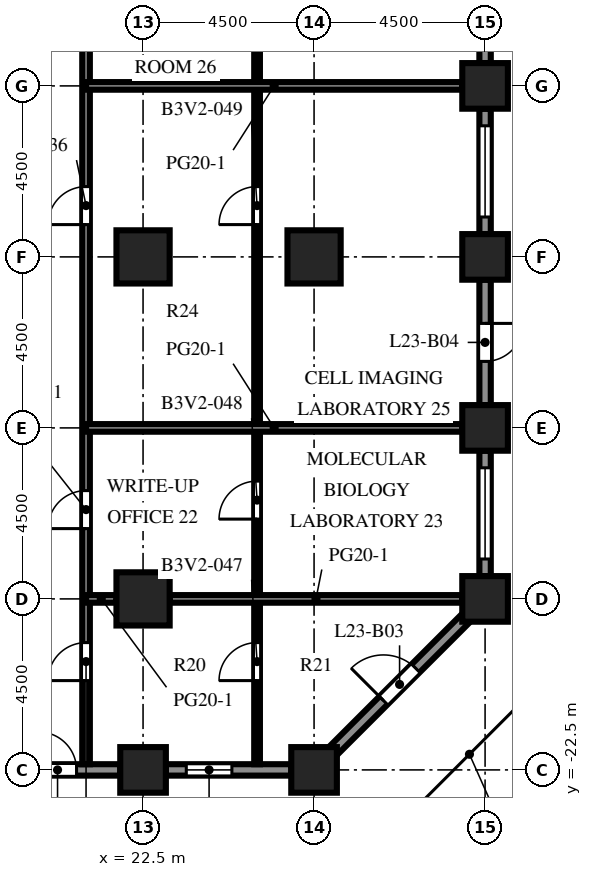
"""IFC4 building model, lengths in metres.
Left out: names, types, materials, properties, quantities, classifications, styles, units other than length and angle.
Written with IfcOpenShell. Run it as: python <this file> out.ifc"""

import sys

from ifc_helpers import new_model, si_unit, direction, frame, frame_2d, origin, origin_2d, place, context, subcontext, project, spatial, rectangle, extrude, element, fill, save


model = new_model("IFC4")
c1 = context("Model", 3, precision=1e-05, world=origin(), true_north=direction((0.0, 1.0)))
c2 = subcontext(c1, "Body", "Model", "MODEL_VIEW")
j1 = project(units=[si_unit("LENGTHUNIT", "METRE"), si_unit("PLANEANGLEUNIT", "RADIAN")], contexts=[c1])
p1 = place(None, origin())
s1 = spatial("IfcSite", under=j1, at=p1, CompositionType="ELEMENT")
p2 = place(p1, origin())
s2 = spatial("IfcBuilding", under=s1, at=p2, CompositionType="ELEMENT")
p3 = place(p2, frame((0.0, 0.0, 102.5)))
s3 = spatial("IfcBuildingStorey", under=s2, at=p3, CompositionType="ELEMENT", Elevation=102.5)
for number, where, z_axis, x_axis in (
    (1, (22.5, -22.5, 0.0), (0.0, 0.0, 1.0), (1.0, 0.0, 0.0)),
    (2, (27.0, -22.5, 0.0), (0.0, 0.0, 1.0), (1.0, 0.0, 0.0)),
    (3, (31.5, -18.0, 0.0), (0.0, 0.0, 1.0), (1.0, 0.0, 0.0)),
    (4, (31.5, -13.5, 0.0), (0.0, 0.0, 1.0), (1.0, 0.0, 0.0)),
    (5, (31.5, -9.0, 0.0), (0.0, 0.0, 1.0), (1.0, 0.0, 0.0)),
    (6, (31.5, -4.5, 0.0), (0.0, 0.0, 1.0), (1.0, 0.0, 0.0)),
):
    element("IfcColumn", number, at=place(p3, frame(where, z_axis=z_axis, x_axis=x_axis)), inside=s3, PredefinedType="COLUMN", context=c2, shape_type="SweptSolid", body=[
        extrude(rectangle(XDim=1.2, YDim=1.2, at=origin_2d()), origin(), (0.0, 0.0, 1.0), 4.1),
    ])
for number, where, z_axis, x_axis in (
    (7, (22.5, -18.0, 0.0), (0.0, 0.0, 1.0), (1.0, 0.0, 0.0)),
    (8, (22.5, -9.0, 0.0), (0.0, 0.0, 1.0), (1.0, 0.0, 0.0)),
    (9, (27.0, -9.0, 0.0), (0.0, 0.0, 1.0), (1.0, 0.0, 0.0)),
):
    element("IfcColumn", number, at=place(p3, frame(where, z_axis=z_axis, x_axis=x_axis)), inside=s3, PredefinedType="COLUMN", context=c2, shape_type="SweptSolid", body=[
        extrude(rectangle(XDim=1.4, YDim=1.4, at=origin_2d()), origin(), (0.0, 0.0, 1.0), 4.1),
    ])
p4 = place(p3, frame((21.9, -22.5, 0.0), z_axis=(0.0, 0.0, 1.0), x_axis=(-1.0, 0.0, 0.0)))
e10 = element("IfcWall", 10, at=p4, inside=s3, PredefinedType="SOLIDWALL", context=c2, shape_type="SweptSolid", body=[
    extrude(rectangle(XDim=3.3, YDim=0.3, at=frame_2d((1.65, 0.0))), origin(), (0.0, 0.0, 1.0), 2.75),
])
p5 = place(p4, frame((1.15, 0.0, 0.0)))
e11 = element("IfcOpeningElement", 11, at=p5, cuts=e10, PredefinedType="OPENING", context=c2, shape_type="SweptSolid", body=[
    extrude(rectangle(XDim=1.0, YDim=2.2, at=frame_2d((0.5, 1.1))), frame((0.0, 0.16, 0.0), z_axis=(0.0, -1.0, 0.0), x_axis=(1.0, 0.0, 0.0)), (0.0, 0.0, 1.0), 0.32),
])
p6 = place(p3, frame((26.4, -22.5, 0.0), z_axis=(0.0, 0.0, 1.0), x_axis=(-1.0, 0.0, 0.0)))
e12 = element("IfcWall", 12, at=p6, inside=s3, PredefinedType="SOLIDWALL", context=c2, shape_type="SweptSolid", body=[
    extrude(rectangle(XDim=3.3, YDim=0.3, at=frame_2d((1.65, 0.0))), origin(), (0.0, 0.0, 1.0), 2.75),
])
p7 = place(p6, frame((1.562, 0.0, 0.8)))
e13 = element("IfcOpeningElement", 13, at=p7, cuts=e12, PredefinedType="OPENING", context=c2, shape_type="SweptSolid", body=[
    extrude(rectangle(XDim=1.2, YDim=1.7, at=frame_2d((0.6, 0.85))), frame((0.0, 0.16, 0.0), z_axis=(0.0, -1.0, 0.0), x_axis=(1.0, 0.0, 0.0)), (0.0, 0.0, 1.0), 0.32),
])
p8 = place(p3, frame((31.006, -18.494, 0.0), z_axis=(0.0, 0.0, 1.0), x_axis=(-0.707106781187, -0.707106781187, 0.0)))
e14 = element("IfcWall", 14, at=p8, inside=s3, PredefinedType="SOLIDWALL", context=c2, shape_type="SweptSolid", body=[
    extrude(rectangle(XDim=4.967, YDim=0.3, at=frame_2d((2.483, 0.0))), origin(), (0.0, 0.0, 1.0), 2.75),
])
p9 = place(p8, frame((1.884, 0.0, 0.0)))
e15 = element("IfcOpeningElement", 15, at=p9, cuts=e14, PredefinedType="OPENING", context=c2, shape_type="SweptSolid", body=[
    extrude(rectangle(XDim=1.2, YDim=2.2, at=frame_2d((0.6, 1.1))), frame((0.0, 0.16, 0.0), z_axis=(0.0, -1.0, 0.0), x_axis=(1.0, 0.0, 0.0)), (0.0, 0.0, 1.0), 0.32),
])
p10 = place(p3, frame((31.5, -14.1, 0.0), z_axis=(0.0, 0.0, 1.0), x_axis=(0.0, -1.0, 0.0)))
e16 = element("IfcWall", 16, at=p10, inside=s3, PredefinedType="SOLIDWALL", context=c2, shape_type="SweptSolid", body=[
    extrude(rectangle(XDim=3.3, YDim=0.3, at=frame_2d((1.65, 0.0))), origin(), (0.0, 0.0, 1.0), 2.75),
])
p11 = place(p10, frame((0.45, 0.0, 0.8)))
e17 = element("IfcOpeningElement", 17, at=p11, cuts=e16, PredefinedType="OPENING", context=c2, shape_type="SweptSolid", body=[
    extrude(rectangle(XDim=2.4, YDim=1.7, at=frame_2d((1.2, 0.85))), frame((0.0, 0.16, 0.0), z_axis=(0.0, -1.0, 0.0), x_axis=(1.0, 0.0, 0.0)), (0.0, 0.0, 1.0), 0.32),
])
p12 = place(p3, frame((31.5, -9.6, 0.0), z_axis=(0.0, 0.0, 1.0), x_axis=(0.0, -1.0, 0.0)))
e18 = element("IfcWall", 18, at=p12, inside=s3, PredefinedType="SOLIDWALL", context=c2, shape_type="SweptSolid", body=[
    extrude(rectangle(XDim=3.3, YDim=0.3, at=frame_2d((1.65, 0.0))), origin(), (0.0, 0.0, 1.0), 2.75),
])
p13 = place(p12, frame((1.15, 0.0, 0.0)))
e19 = element("IfcOpeningElement", 19, at=p13, cuts=e18, PredefinedType="OPENING", context=c2, shape_type="SweptSolid", body=[
    extrude(rectangle(XDim=1.0, YDim=2.2, at=frame_2d((0.5, 1.1))), frame((0.0, 0.16, 0.0), z_axis=(0.0, -1.0, 0.0), x_axis=(1.0, 0.0, 0.0)), (0.0, 0.0, 1.0), 0.32),
])
p14 = place(p3, frame((31.5, -5.1, 0.0), z_axis=(0.0, 0.0, 1.0), x_axis=(0.0, -1.0, 0.0)))
e20 = element("IfcWall", 20, at=p14, inside=s3, PredefinedType="SOLIDWALL", context=c2, shape_type="SweptSolid", body=[
    extrude(rectangle(XDim=3.3, YDim=0.3, at=frame_2d((1.65, 0.0))), origin(), (0.0, 0.0, 1.0), 2.75),
])
p15 = place(p14, frame((0.45, 0.0, 0.8)))
e21 = element("IfcOpeningElement", 21, at=p15, cuts=e20, PredefinedType="OPENING", context=c2, shape_type="SweptSolid", body=[
    extrude(rectangle(XDim=2.4, YDim=1.7, at=frame_2d((1.2, 0.85))), frame((0.0, 0.16, 0.0), z_axis=(0.0, -1.0, 0.0), x_axis=(1.0, 0.0, 0.0)), (0.0, 0.0, 1.0), 0.32),
])
p16 = place(p3, frame((31.5, -0.6, 0.0), z_axis=(0.0, 0.0, 1.0), x_axis=(0.0, -1.0, 0.0)))
e22 = element("IfcWall", 22, at=p16, inside=s3, PredefinedType="SOLIDWALL", context=c2, shape_type="SweptSolid", body=[
    extrude(rectangle(XDim=3.3, YDim=0.3, at=frame_2d((1.65, 0.0))), origin(), (0.0, 0.0, 1.0), 2.75),
])
p17 = place(p16, frame((0.45, 0.0, 0.8)))
e23 = element("IfcOpeningElement", 23, at=p17, cuts=e22, PredefinedType="OPENING", context=c2, shape_type="SweptSolid", body=[
    extrude(rectangle(XDim=2.4, YDim=1.7, at=frame_2d((1.2, 0.85))), frame((0.0, 0.16, 0.0), z_axis=(0.0, -1.0, 0.0), x_axis=(1.0, 0.0, 0.0)), (0.0, 0.0, 1.0), 0.32),
])
p18 = place(p3, frame((21.0, 31.35, 0.0), z_axis=(0.0, 0.0, 1.0), x_axis=(0.0, -1.0, 0.0)))
e24 = element("IfcWall", 24, at=p18, inside=s3, PredefinedType="PARTITIONING", context=c2, shape_type="SweptSolid", body=[
    extrude(rectangle(XDim=53.7, YDim=0.2, at=frame_2d((26.85, 0.0))), origin(), (0.0, 0.0, 1.0), 3.65),
])
p19 = place(p18, frame((50.5, 0.0, 0.0)))
e25 = element("IfcOpeningElement", 25, at=p19, cuts=e24, PredefinedType="OPENING", context=c2, shape_type="SweptSolid", body=[
    extrude(rectangle(XDim=1.0, YDim=2.1, at=frame_2d((0.5, 1.05))), frame((0.0, 0.11, 0.0), z_axis=(0.0, -1.0, 0.0), x_axis=(1.0, 0.0, 0.0)), (0.0, 0.0, 1.0), 0.22),
])
p20 = place(p18, frame((46.5, 0.0, 0.0)))
e26 = element("IfcOpeningElement", 26, at=p20, cuts=e24, PredefinedType="OPENING", context=c2, shape_type="SweptSolid", body=[
    extrude(rectangle(XDim=1.0, YDim=2.1, at=frame_2d((0.5, 1.05))), frame((0.0, 0.11, 0.0), z_axis=(0.0, -1.0, 0.0), x_axis=(1.0, 0.0, 0.0)), (0.0, 0.0, 1.0), 0.22),
])
p21 = place(p18, frame((38.5, 0.0, 0.0)))
e27 = element("IfcOpeningElement", 27, at=p21, cuts=e24, PredefinedType="OPENING", context=c2, shape_type="SweptSolid", body=[
    extrude(rectangle(XDim=1.0, YDim=2.1, at=frame_2d((0.5, 1.05))), frame((0.0, 0.11, 0.0), z_axis=(0.0, -1.0, 0.0), x_axis=(1.0, 0.0, 0.0)), (0.0, 0.0, 1.0), 0.22),
])
p22 = place(p18, frame((33.0, 0.0, 0.0)))
e28 = element("IfcOpeningElement", 28, at=p22, cuts=e24, PredefinedType="OPENING", context=c2, shape_type="SweptSolid", body=[
    extrude(rectangle(XDim=1.0, YDim=2.1, at=frame_2d((0.5, 1.05))), frame((0.0, 0.11, 0.0), z_axis=(0.0, -1.0, 0.0), x_axis=(1.0, 0.0, 0.0)), (0.0, 0.0, 1.0), 0.22),
])
p23 = place(p18, frame((23.5, 0.0, 0.0)))
e29 = element("IfcOpeningElement", 29, at=p23, cuts=e24, PredefinedType="OPENING", context=c2, shape_type="SweptSolid", body=[
    extrude(rectangle(XDim=1.0, YDim=2.1, at=frame_2d((0.5, 1.05))), frame((0.0, 0.11, 0.0), z_axis=(0.0, -1.0, 0.0), x_axis=(1.0, 0.0, 0.0)), (0.0, 0.0, 1.0), 0.22),
])
p24 = place(p18, frame((15.75, 0.0, 0.0)))
e30 = element("IfcOpeningElement", 30, at=p24, cuts=e24, PredefinedType="OPENING", context=c2, shape_type="SweptSolid", body=[
    extrude(rectangle(XDim=1.0, YDim=2.1, at=frame_2d((0.5, 1.05))), frame((0.0, 0.11, 0.0), z_axis=(0.0, -1.0, 0.0), x_axis=(1.0, 0.0, 0.0)), (0.0, 0.0, 1.0), 0.22),
])
p25 = place(p18, frame((7.0, 0.0, 0.0)))
e31 = element("IfcOpeningElement", 31, at=p25, cuts=e24, PredefinedType="OPENING", context=c2, shape_type="SweptSolid", body=[
    extrude(rectangle(XDim=1.0, YDim=2.1, at=frame_2d((0.5, 1.05))), frame((0.0, 0.11, 0.0), z_axis=(0.0, -1.0, 0.0), x_axis=(1.0, 0.0, 0.0)), (0.0, 0.0, 1.0), 0.22),
])
p26 = place(p18, frame((1.0, 0.0, 0.0)))
e32 = element("IfcOpeningElement", 32, at=p26, cuts=e24, PredefinedType="OPENING", context=c2, shape_type="SweptSolid", body=[
    extrude(rectangle(XDim=1.0, YDim=2.1, at=frame_2d((0.5, 1.05))), frame((0.0, 0.11, 0.0), z_axis=(0.0, -1.0, 0.0), x_axis=(1.0, 0.0, 0.0)), (0.0, 0.0, 1.0), 0.22),
])
p27 = place(p3, frame((25.5, 31.35, 0.0), z_axis=(0.0, 0.0, 1.0), x_axis=(0.0, -1.0, 0.0)))
e33 = element("IfcWall", 33, at=p27, inside=s3, PredefinedType="PARTITIONING", context=c2, shape_type="SweptSolid", body=[
    extrude(rectangle(XDim=53.7, YDim=0.15, at=frame_2d((26.85, 0.0))), origin(), (0.0, 0.0, 1.0), 3.65),
])
p28 = place(p27, frame((50.5, 0.0, 0.0)))
e34 = element("IfcOpeningElement", 34, at=p28, cuts=e33, PredefinedType="OPENING", context=c2, shape_type="SweptSolid", body=[
    extrude(rectangle(XDim=1.0, YDim=2.1, at=frame_2d((0.5, 1.05))), frame((0.0, 0.085, 0.0), z_axis=(0.0, -1.0, 0.0), x_axis=(1.0, 0.0, 0.0)), (0.0, 0.0, 1.0), 0.17),
])
p29 = place(p27, frame((46.25, 0.0, 0.0)))
e35 = element("IfcOpeningElement", 35, at=p29, cuts=e33, PredefinedType="OPENING", context=c2, shape_type="SweptSolid", body=[
    extrude(rectangle(XDim=1.0, YDim=2.1, at=frame_2d((0.5, 1.05))), frame((0.0, 0.085, 0.0), z_axis=(0.0, -1.0, 0.0), x_axis=(1.0, 0.0, 0.0)), (0.0, 0.0, 1.0), 0.17),
])
p30 = place(p27, frame((38.5, 0.0, 0.0)))
e36 = element("IfcOpeningElement", 36, at=p30, cuts=e33, PredefinedType="OPENING", context=c2, shape_type="SweptSolid", body=[
    extrude(rectangle(XDim=1.0, YDim=2.1, at=frame_2d((0.5, 1.05))), frame((0.0, 0.085, 0.0), z_axis=(0.0, -1.0, 0.0), x_axis=(1.0, 0.0, 0.0)), (0.0, 0.0, 1.0), 0.17),
])
p31 = place(p27, frame((33.0, 0.0, 0.0)))
e37 = element("IfcOpeningElement", 37, at=p31, cuts=e33, PredefinedType="OPENING", context=c2, shape_type="SweptSolid", body=[
    extrude(rectangle(XDim=1.0, YDim=2.1, at=frame_2d((0.5, 1.05))), frame((0.0, 0.085, 0.0), z_axis=(0.0, -1.0, 0.0), x_axis=(1.0, 0.0, 0.0)), (0.0, 0.0, 1.0), 0.17),
])
p32 = place(p27, frame((24.75, 0.0, 0.0)))
e38 = element("IfcOpeningElement", 38, at=p32, cuts=e33, PredefinedType="OPENING", context=c2, shape_type="SweptSolid", body=[
    extrude(rectangle(XDim=1.0, YDim=2.1, at=frame_2d((0.5, 1.05))), frame((0.0, 0.085, 0.0), z_axis=(0.0, -1.0, 0.0), x_axis=(1.0, 0.0, 0.0)), (0.0, 0.0, 1.0), 0.17),
])
p33 = place(p27, frame((15.5, 0.0, 0.0)))
e39 = element("IfcOpeningElement", 39, at=p33, cuts=e33, PredefinedType="OPENING", context=c2, shape_type="SweptSolid", body=[
    extrude(rectangle(XDim=1.0, YDim=2.1, at=frame_2d((0.5, 1.05))), frame((0.0, 0.085, 0.0), z_axis=(0.0, -1.0, 0.0), x_axis=(1.0, 0.0, 0.0)), (0.0, 0.0, 1.0), 0.17),
])
p34 = place(p27, frame((9.75, 0.0, 0.0)))
e40 = element("IfcOpeningElement", 40, at=p34, cuts=e33, PredefinedType="OPENING", context=c2, shape_type="SweptSolid", body=[
    extrude(rectangle(XDim=1.0, YDim=2.1, at=frame_2d((0.5, 1.05))), frame((0.0, 0.085, 0.0), z_axis=(0.0, -1.0, 0.0), x_axis=(1.0, 0.0, 0.0)), (0.0, 0.0, 1.0), 0.17),
])
p35 = place(p27, frame((1.5, 0.0, 0.0)))
e41 = element("IfcOpeningElement", 41, at=p35, cuts=e33, PredefinedType="OPENING", context=c2, shape_type="SweptSolid", body=[
    extrude(rectangle(XDim=1.0, YDim=2.1, at=frame_2d((0.5, 1.05))), frame((0.0, 0.085, 0.0), z_axis=(0.0, -1.0, 0.0), x_axis=(1.0, 0.0, 0.0)), (0.0, 0.0, 1.0), 0.17),
])
p36 = place(p3, frame((21.0, -18.0, 0.0), z_axis=(0.0, 0.0, 1.0), x_axis=(1.0, 0.0, 0.0)))
e42 = element("IfcWall", 42, at=p36, inside=s3, PredefinedType="PARTITIONING", context=c2, shape_type="SweptSolid", body=[
    extrude(rectangle(XDim=0.8, YDim=0.2, at=frame_2d((0.4, 0.0))), origin(), (0.0, 0.0, 1.0), 3.65),
])
p37 = place(p3, frame((23.2, -18.0, 0.0), z_axis=(0.0, 0.0, 1.0), x_axis=(1.0, 0.0, 0.0)))
e43 = element("IfcWall", 43, at=p37, inside=s3, PredefinedType="PARTITIONING", context=c2, shape_type="SweptSolid", body=[
    extrude(rectangle(XDim=7.7, YDim=0.2, at=frame_2d((3.85, 0.0))), origin(), (0.0, 0.0, 1.0), 3.65),
])
for number, where, z_axis, x_axis in (
    (44, (21.0, -13.5, 0.0), (0.0, 0.0, 1.0), (1.0, 0.0, 0.0)),
    (45, (21.0, -4.5, 0.0), (0.0, 0.0, 1.0), (1.0, 0.0, 0.0)),
):
    element("IfcWall", number, at=place(p3, frame(where, z_axis=z_axis, x_axis=x_axis)), inside=s3, PredefinedType="PARTITIONING", context=c2, shape_type="SweptSolid", body=[
        extrude(rectangle(XDim=9.9, YDim=0.2, at=frame_2d((4.95, 0.0))), origin(), (0.0, 0.0, 1.0), 3.65),
    ])
p38 = place(p5, origin())
e46 = element("IfcDoor", 46, at=p38, inside=s3, OperationType="SINGLE_SWING_RIGHT", PredefinedType="DOOR", context=c2, shape_type="SweptSolid", body=[
    extrude(rectangle(XDim=1.0, YDim=2.2, at=frame_2d((0.5, 1.1))), frame((0.0, 0.025, 0.0), z_axis=(0.0, -1.0, 0.0), x_axis=(1.0, 0.0, 0.0)), (0.0, 0.0, 1.0), 0.05),
])
fill(e11, e46)
p39 = place(p7, origin())
e47 = element("IfcWindow", 47, at=p39, inside=s3, PartitioningType="SINGLE_PANEL", PredefinedType="WINDOW", context=c2, shape_type="SweptSolid", body=[
    extrude(rectangle(XDim=1.2, YDim=1.7, at=frame_2d((0.6, 0.85))), frame((0.0, 0.03, 0.0), z_axis=(0.0, -1.0, 0.0), x_axis=(1.0, 0.0, 0.0)), (0.0, 0.0, 1.0), 0.06),
])
fill(e13, e47)
p40 = place(p9, origin())
e48 = element("IfcDoor", 48, at=p40, inside=s3, OperationType="SINGLE_SWING_RIGHT", PredefinedType="DOOR", context=c2, shape_type="SweptSolid", body=[
    extrude(rectangle(XDim=1.2, YDim=2.2, at=frame_2d((0.6, 1.1))), frame((0.0, 0.025, 0.0), z_axis=(0.0, -1.0, 0.0), x_axis=(1.0, 0.0, 0.0)), (0.0, 0.0, 1.0), 0.05),
])
fill(e15, e48)
p41 = place(p11, origin())
e49 = element("IfcWindow", 49, at=p41, inside=s3, PartitioningType="SINGLE_PANEL", PredefinedType="WINDOW", context=c2, shape_type="SweptSolid", body=[
    extrude(rectangle(XDim=2.4, YDim=1.7, at=frame_2d((1.2, 0.85))), frame((0.0, 0.03, 0.0), z_axis=(0.0, -1.0, 0.0), x_axis=(1.0, 0.0, 0.0)), (0.0, 0.0, 1.0), 0.06),
])
fill(e17, e49)
p42 = place(p13, origin())
e50 = element("IfcDoor", 50, at=p42, inside=s3, OperationType="SINGLE_SWING_LEFT", PredefinedType="DOOR", context=c2, shape_type="SweptSolid", body=[
    extrude(rectangle(XDim=1.0, YDim=2.2, at=frame_2d((0.5, 1.1))), frame((0.0, 0.025, 0.0), z_axis=(0.0, -1.0, 0.0), x_axis=(1.0, 0.0, 0.0)), (0.0, 0.0, 1.0), 0.05),
])
fill(e19, e50)
p43 = place(p15, origin())
e51 = element("IfcWindow", 51, at=p43, inside=s3, PartitioningType="SINGLE_PANEL", PredefinedType="WINDOW", context=c2, shape_type="SweptSolid", body=[
    extrude(rectangle(XDim=2.4, YDim=1.7, at=frame_2d((1.2, 0.85))), frame((0.0, 0.03, 0.0), z_axis=(0.0, -1.0, 0.0), x_axis=(1.0, 0.0, 0.0)), (0.0, 0.0, 1.0), 0.06),
])
fill(e21, e51)
p44 = place(p19, origin())
e52 = element("IfcDoor", 52, at=p44, inside=s3, OperationType="SINGLE_SWING_RIGHT", PredefinedType="DOOR", context=c2, shape_type="SweptSolid", body=[
    extrude(rectangle(XDim=1.0, YDim=2.1, at=frame_2d((0.5, 1.05))), frame((0.0, 0.025, 0.0), z_axis=(0.0, -1.0, 0.0), x_axis=(1.0, 0.0, 0.0)), (0.0, 0.0, 1.0), 0.05),
])
fill(e25, e52)
p45 = place(p20, origin())
e53 = element("IfcDoor", 53, at=p45, inside=s3, OperationType="SINGLE_SWING_RIGHT", PredefinedType="DOOR", context=c2, shape_type="SweptSolid", body=[
    extrude(rectangle(XDim=1.0, YDim=2.1, at=frame_2d((0.5, 1.05))), frame((0.0, 0.025, 0.0), z_axis=(0.0, -1.0, 0.0), x_axis=(1.0, 0.0, 0.0)), (0.0, 0.0, 1.0), 0.05),
])
fill(e26, e53)
p46 = place(p21, origin())
e54 = element("IfcDoor", 54, at=p46, inside=s3, OperationType="SINGLE_SWING_RIGHT", PredefinedType="DOOR", context=c2, shape_type="SweptSolid", body=[
    extrude(rectangle(XDim=1.0, YDim=2.1, at=frame_2d((0.5, 1.05))), frame((0.0, 0.025, 0.0), z_axis=(0.0, -1.0, 0.0), x_axis=(1.0, 0.0, 0.0)), (0.0, 0.0, 1.0), 0.05),
])
fill(e27, e54)
p47 = place(p28, origin())
e55 = element("IfcDoor", 55, at=p47, inside=s3, OperationType="SINGLE_SWING_RIGHT", PredefinedType="DOOR", context=c2, shape_type="SweptSolid", body=[
    extrude(rectangle(XDim=1.0, YDim=2.1, at=frame_2d((0.5, 1.05))), frame((0.0, 0.025, 0.0), z_axis=(0.0, -1.0, 0.0), x_axis=(1.0, 0.0, 0.0)), (0.0, 0.0, 1.0), 0.05),
])
fill(e34, e55)
p48 = place(p29, origin())
e56 = element("IfcDoor", 56, at=p48, inside=s3, OperationType="SINGLE_SWING_RIGHT", PredefinedType="DOOR", context=c2, shape_type="SweptSolid", body=[
    extrude(rectangle(XDim=1.0, YDim=2.1, at=frame_2d((0.5, 1.05))), frame((0.0, 0.025, 0.0), z_axis=(0.0, -1.0, 0.0), x_axis=(1.0, 0.0, 0.0)), (0.0, 0.0, 1.0), 0.05),
])
fill(e35, e56)
p49 = place(p30, origin())
e57 = element("IfcDoor", 57, at=p49, inside=s3, OperationType="SINGLE_SWING_RIGHT", PredefinedType="DOOR", context=c2, shape_type="SweptSolid", body=[
    extrude(rectangle(XDim=1.0, YDim=2.1, at=frame_2d((0.5, 1.05))), frame((0.0, 0.025, 0.0), z_axis=(0.0, -1.0, 0.0), x_axis=(1.0, 0.0, 0.0)), (0.0, 0.0, 1.0), 0.05),
])
fill(e36, e57)
save(model, sys.argv[1])
